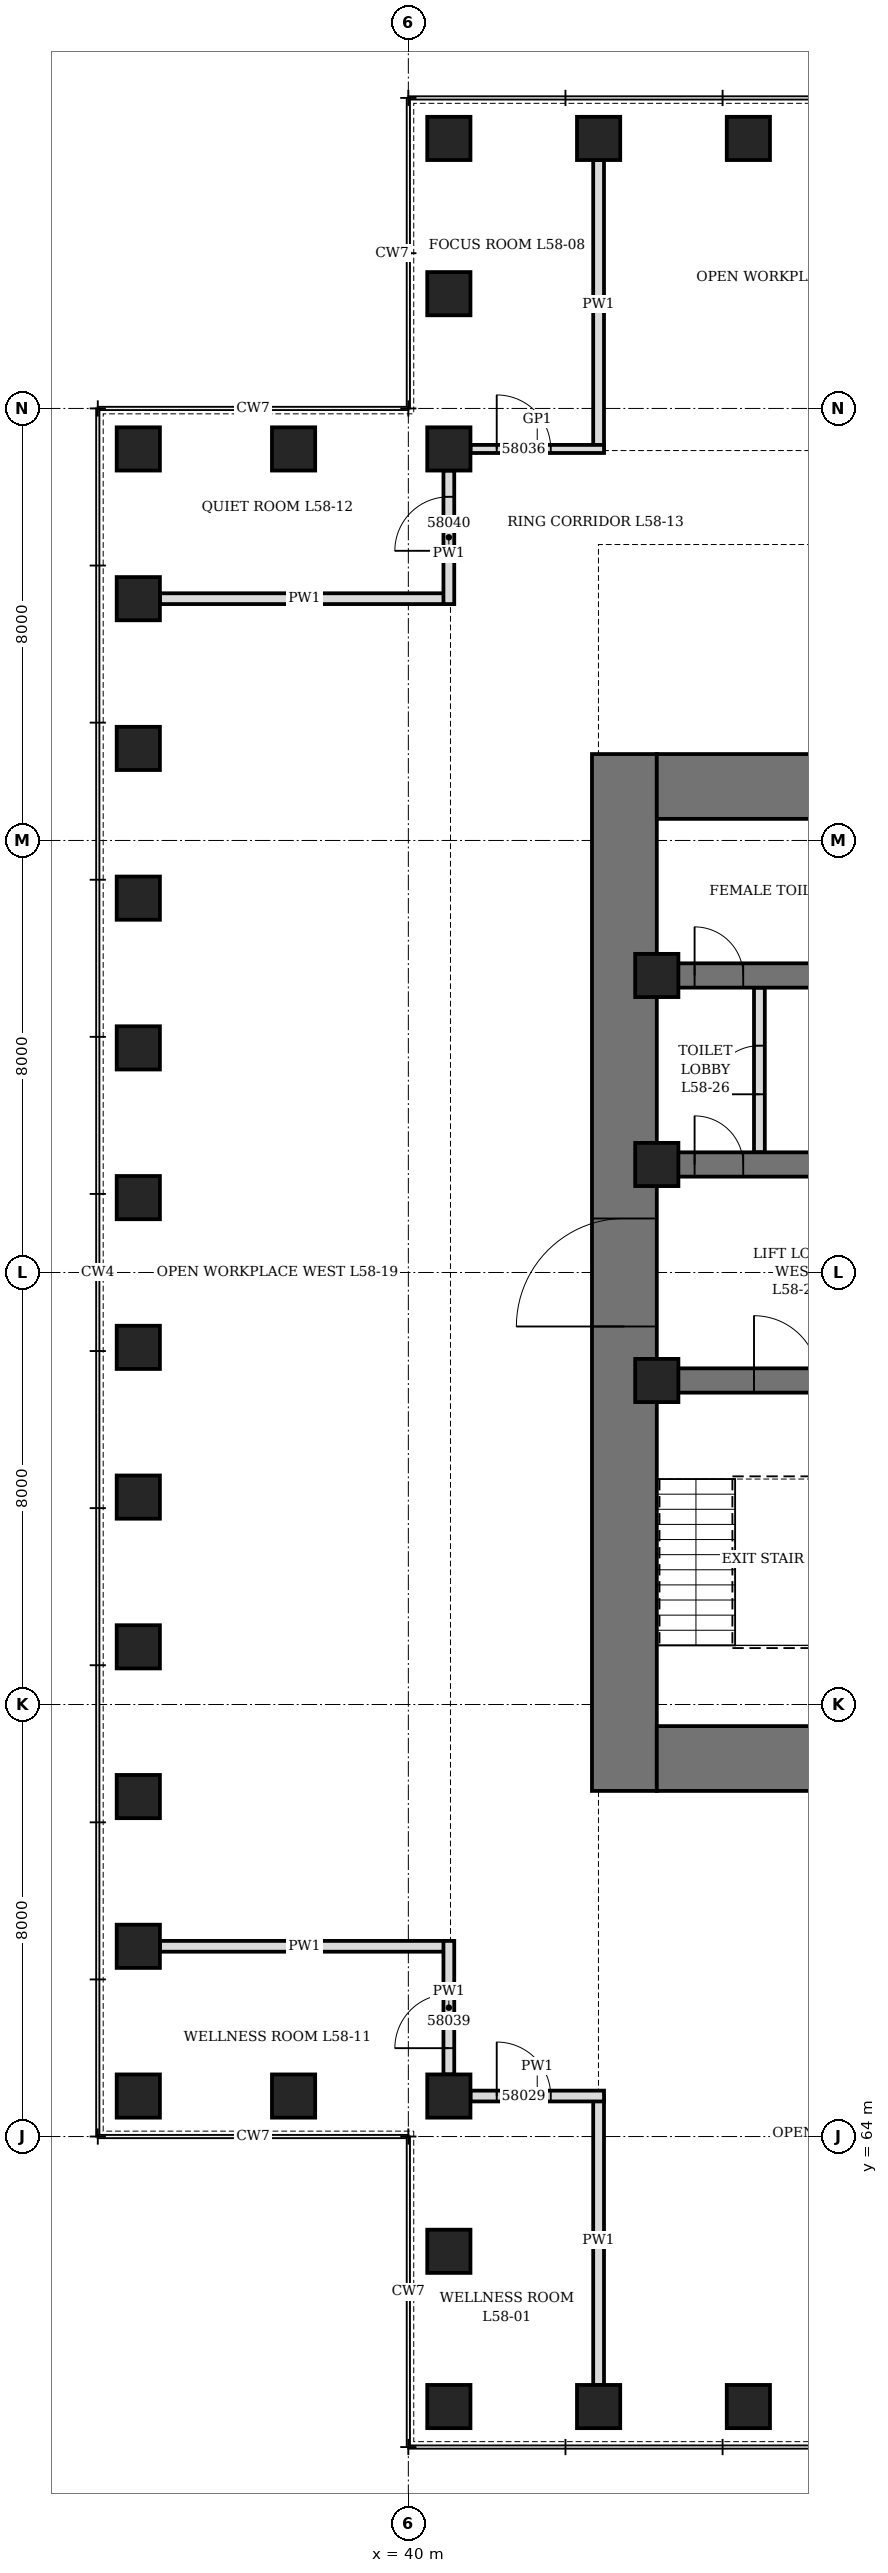
"""IFC4 building model, lengths in metres.
Left out: names, types, materials, properties, quantities, classifications, styles, units other than length and angle.
Written with IfcOpenShell. Run it as: python <this file> out.ifc"""

import sys

from ifc_helpers import new_model, si_unit, direction, frame, frame_2d, origin, origin_2d, place, context, subcontext, project, spatial, rectangle, hollow_rectangle, extrude, element, fill, save


model = new_model("IFC4")
c1 = context("Model", 3, precision=1e-05, world=origin(), true_north=direction((0.0, 1.0)))
c2 = subcontext(c1, "Body", "Model", "MODEL_VIEW")
j1 = project(units=[si_unit("LENGTHUNIT", "METRE"), si_unit("PLANEANGLEUNIT", "RADIAN")], contexts=[c1])
p1 = place(None, origin())
s1 = spatial("IfcSite", under=j1, at=p1, CompositionType="ELEMENT")
p2 = place(p1, origin())
s2 = spatial("IfcBuilding", under=s1, at=p2, CompositionType="ELEMENT")
p3 = place(p2, frame((0.0, 0.0, 258.7)))
s3 = spatial("IfcBuildingStorey", under=s2, at=p3, CompositionType="ELEMENT", Elevation=258.7)
for number, where, z_axis, x_axis in (
    (1, (40.75, 59.0, 0.0), (0.0, 0.0, 1.0), (1.0, 0.0, 0.0)),
    (2, (43.523, 59.0, 0.0), (0.0, 0.0, 1.0), (1.0, 0.0, 0.0)),
    (3, (46.295, 59.0, 0.0), (0.0, 0.0, 1.0), (1.0, 0.0, 0.0)),
    (4, (46.295, 101.0, 0.0), (0.0, 0.0, 1.0), (1.0, 0.0, 0.0)),
    (5, (43.523, 101.0, 0.0), (0.0, 0.0, 1.0), (1.0, 0.0, 0.0)),
    (6, (40.75, 101.0, 0.0), (0.0, 0.0, 1.0), (0.0, 1.0, 0.0)),
    (7, (40.75, 98.125, 0.0), (0.0, 0.0, 1.0), (0.0, 1.0, 0.0)),
    (8, (40.75, 95.25, 0.0), (0.0, 0.0, 1.0), (1.0, 0.0, 0.0)),
    (9, (37.875, 95.25, 0.0), (0.0, 0.0, 1.0), (1.0, 0.0, 0.0)),
    (10, (35.0, 95.25, 0.0), (0.0, 0.0, 1.0), (0.0, 1.0, 0.0)),
    (11, (35.0, 92.477, 0.0), (0.0, 0.0, 1.0), (0.0, 1.0, 0.0)),
    (12, (35.0, 89.705, 0.0), (0.0, 0.0, 1.0), (0.0, 1.0, 0.0)),
    (13, (35.0, 86.932, 0.0), (0.0, 0.0, 1.0), (0.0, 1.0, 0.0)),
    (14, (35.0, 84.159, 0.0), (0.0, 0.0, 1.0), (0.0, 1.0, 0.0)),
    (15, (35.0, 81.386, 0.0), (0.0, 0.0, 1.0), (0.0, 1.0, 0.0)),
    (16, (35.0, 78.614, 0.0), (0.0, 0.0, 1.0), (0.0, 1.0, 0.0)),
    (17, (35.0, 75.841, 0.0), (0.0, 0.0, 1.0), (0.0, 1.0, 0.0)),
    (18, (35.0, 73.068, 0.0), (0.0, 0.0, 1.0), (0.0, 1.0, 0.0)),
    (19, (35.0, 70.295, 0.0), (0.0, 0.0, 1.0), (0.0, 1.0, 0.0)),
    (20, (35.0, 67.523, 0.0), (0.0, 0.0, 1.0), (0.0, 1.0, 0.0)),
    (21, (35.0, 64.75, 0.0), (0.0, 0.0, 1.0), (1.0, 0.0, 0.0)),
    (22, (37.875, 64.75, 0.0), (0.0, 0.0, 1.0), (1.0, 0.0, 0.0)),
    (23, (40.75, 64.75, 0.0), (0.0, 0.0, 1.0), (0.0, 1.0, 0.0)),
    (24, (40.75, 61.875, 0.0), (0.0, 0.0, 1.0), (0.0, 1.0, 0.0)),
):
    element("IfcColumn", number, at=place(p3, frame(where, z_axis=z_axis, x_axis=x_axis)), inside=s3, PredefinedType="COLUMN", context=c2, shape_type="SweptSolid", body=[
        extrude(hollow_rectangle(XDim=0.8, YDim=0.8, WallThickness=0.1, at=origin_2d()), origin(), (0.0, 0.0, 1.0), 4.2),
    ])
p4 = place(p3, frame((44.0, 70.4, 0.0), z_axis=(0.0, 0.0, 1.0), x_axis=(0.0, 1.0, 0.0)))
e25 = element("IfcWall", 25, at=p4, inside=s3, PredefinedType="SHEAR", context=c2, shape_type="SweptSolid", body=[
    extrude(rectangle(XDim=19.2, YDim=1.2, at=frame_2d((9.6, 0.0))), origin(), (0.0, 0.0, 1.0), 4.2),
])
p5 = place(p4, frame((8.6, 0.0, 0.0)))
e26 = element("IfcOpeningElement", 26, at=p5, cuts=e25, PredefinedType="OPENING", context=c2, shape_type="SweptSolid", body=[
    extrude(rectangle(XDim=2.0, YDim=2.4, at=frame_2d((1.0, 1.2))), frame((0.0, 0.61, 0.0), z_axis=(0.0, -1.0, 0.0), x_axis=(1.0, 0.0, 0.0)), (0.0, 0.0, 1.0), 1.22),
])
p6 = place(p3, frame((44.6, 71.0, 0.0), z_axis=(0.0, 0.0, 1.0), x_axis=(1.0, 0.0, 0.0)))
e27 = element("IfcWall", 27, at=p6, inside=s3, PredefinedType="SHEAR", context=c2, shape_type="SweptSolid", body=[
    extrude(rectangle(XDim=22.8, YDim=1.2, at=frame_2d((11.4, 0.0))), origin(), (0.0, 0.0, 1.0), 4.2),
])
p7 = place(p6, frame((6.35, 0.0, 0.0)))
e28 = element("IfcOpeningElement", 28, at=p7, cuts=e27, PredefinedType="OPENING", context=c2, shape_type="SweptSolid", body=[
    extrude(rectangle(XDim=1.1, YDim=2.2, at=frame_2d((0.55, 1.1))), frame((0.0, 0.61, 0.0), z_axis=(0.0, -1.0, 0.0), x_axis=(1.0, 0.0, 0.0)), (0.0, 0.0, 1.0), 1.22),
])
p8 = place(p6, frame((9.35, 0.0, 0.0)))
e29 = element("IfcOpeningElement", 29, at=p8, cuts=e27, PredefinedType="OPENING", context=c2, shape_type="SweptSolid", body=[
    extrude(rectangle(XDim=1.1, YDim=2.2, at=frame_2d((0.55, 1.1))), frame((0.0, 0.61, 0.0), z_axis=(0.0, -1.0, 0.0), x_axis=(1.0, 0.0, 0.0)), (0.0, 0.0, 1.0), 1.22),
])
p9 = place(p6, frame((12.35, 0.0, 0.0)))
e30 = element("IfcOpeningElement", 30, at=p9, cuts=e27, PredefinedType="OPENING", context=c2, shape_type="SweptSolid", body=[
    extrude(rectangle(XDim=1.1, YDim=2.2, at=frame_2d((0.55, 1.1))), frame((0.0, 0.61, 0.0), z_axis=(0.0, -1.0, 0.0), x_axis=(1.0, 0.0, 0.0)), (0.0, 0.0, 1.0), 1.22),
])
p10 = place(p6, frame((15.35, 0.0, 0.0)))
e31 = element("IfcOpeningElement", 31, at=p10, cuts=e27, PredefinedType="OPENING", context=c2, shape_type="SweptSolid", body=[
    extrude(rectangle(XDim=1.1, YDim=2.2, at=frame_2d((0.55, 1.1))), frame((0.0, 0.61, 0.0), z_axis=(0.0, -1.0, 0.0), x_axis=(1.0, 0.0, 0.0)), (0.0, 0.0, 1.0), 1.22),
])
p11 = place(p3, frame((44.6, 89.0, 0.0), z_axis=(0.0, 0.0, 1.0), x_axis=(1.0, 0.0, 0.0)))
e32 = element("IfcWall", 32, at=p11, inside=s3, PredefinedType="SHEAR", context=c2, shape_type="SweptSolid", body=[
    extrude(rectangle(XDim=22.8, YDim=1.2, at=frame_2d((11.4, 0.0))), origin(), (0.0, 0.0, 1.0), 4.2),
])
p12 = place(p11, frame((7.9, 0.0, 0.0)))
e33 = element("IfcOpeningElement", 33, at=p12, cuts=e32, PredefinedType="OPENING", context=c2, shape_type="SweptSolid", body=[
    extrude(rectangle(XDim=1.0, YDim=2.1, at=frame_2d((0.5, 1.05))), frame((0.0, 0.61, 0.0), z_axis=(0.0, -1.0, 0.0), x_axis=(1.0, 0.0, 0.0)), (0.0, 0.0, 1.0), 1.22),
])
p13 = place(p11, frame((12.025, 0.0, 0.0)))
e34 = element("IfcOpeningElement", 34, at=p13, cuts=e32, PredefinedType="OPENING", context=c2, shape_type="SweptSolid", body=[
    extrude(rectangle(XDim=0.9, YDim=2.1, at=frame_2d((0.45, 1.05))), frame((0.0, 0.61, 0.0), z_axis=(0.0, -1.0, 0.0), x_axis=(1.0, 0.0, 0.0)), (0.0, 0.0, 1.0), 1.22),
])
p14 = place(p11, frame((13.962, 0.0, 0.0)))
e35 = element("IfcOpeningElement", 35, at=p14, cuts=e32, PredefinedType="OPENING", context=c2, shape_type="SweptSolid", body=[
    extrude(rectangle(XDim=0.9, YDim=2.1, at=frame_2d((0.45, 1.05))), frame((0.0, 0.61, 0.0), z_axis=(0.0, -1.0, 0.0), x_axis=(1.0, 0.0, 0.0)), (0.0, 0.0, 1.0), 1.22),
])
p15 = place(p3, frame((44.6, 78.0, 0.0), z_axis=(0.0, 0.0, 1.0), x_axis=(1.0, 0.0, 0.0)))
e36 = element("IfcWall", 36, at=p15, inside=s3, PredefinedType="SHEAR", context=c2, shape_type="SweptSolid", body=[
    extrude(rectangle(XDim=5.175, YDim=0.45, at=frame_2d((2.587, 0.0))), origin(), (0.0, 0.0, 1.0), 4.2),
])
p16 = place(p15, frame((1.8, 0.0, 0.0)))
e37 = element("IfcOpeningElement", 37, at=p16, cuts=e36, PredefinedType="OPENING", context=c2, shape_type="SweptSolid", body=[
    extrude(rectangle(XDim=1.2, YDim=2.1, at=frame_2d((0.6, 1.05))), frame((0.0, 0.235, 0.0), z_axis=(0.0, -1.0, 0.0), x_axis=(1.0, 0.0, 0.0)), (0.0, 0.0, 1.0), 0.47),
])
p17 = place(p3, frame((44.6, 82.0, 0.0), z_axis=(0.0, 0.0, 1.0), x_axis=(1.0, 0.0, 0.0)))
e38 = element("IfcWall", 38, at=p17, inside=s3, PredefinedType="SHEAR", context=c2, shape_type="SweptSolid", body=[
    extrude(rectangle(XDim=5.175, YDim=0.45, at=frame_2d((2.587, 0.0))), origin(), (0.0, 0.0, 1.0), 4.2),
])
p18 = place(p17, frame((0.7, 0.0, 0.0)))
e39 = element("IfcOpeningElement", 39, at=p18, cuts=e38, PredefinedType="OPENING", context=c2, shape_type="SweptSolid", body=[
    extrude(rectangle(XDim=0.9, YDim=2.1, at=frame_2d((0.45, 1.05))), frame((0.0, 0.235, 0.0), z_axis=(0.0, -1.0, 0.0), x_axis=(1.0, 0.0, 0.0)), (0.0, 0.0, 1.0), 0.47),
])
p19 = place(p3, frame((44.6, 85.5, 0.0), z_axis=(0.0, 0.0, 1.0), x_axis=(1.0, 0.0, 0.0)))
e40 = element("IfcWall", 40, at=p19, inside=s3, PredefinedType="SHEAR", context=c2, shape_type="SweptSolid", body=[
    extrude(rectangle(XDim=5.175, YDim=0.45, at=frame_2d((2.587, 0.0))), origin(), (0.0, 0.0, 1.0), 4.2),
])
p20 = place(p19, frame((0.7, 0.0, 0.0)))
e41 = element("IfcOpeningElement", 41, at=p20, cuts=e40, PredefinedType="OPENING", context=c2, shape_type="SweptSolid", body=[
    extrude(rectangle(XDim=0.9, YDim=2.1, at=frame_2d((0.45, 1.05))), frame((0.0, 0.235, 0.0), z_axis=(0.0, -1.0, 0.0), x_axis=(1.0, 0.0, 0.0)), (0.0, 0.0, 1.0), 0.47),
])
for number, where, z_axis, x_axis in (
    (42, (44.6, 78.0, 0.0), (0.0, 0.0, 1.0), (1.0, 0.0, 0.0)),
    (43, (44.6, 82.0, 0.0), (0.0, 0.0, 1.0), (1.0, 0.0, 0.0)),
    (44, (44.6, 85.5, 0.0), (0.0, 0.0, 1.0), (1.0, 0.0, 0.0)),
):
    element("IfcColumn", number, at=place(p3, frame(where, z_axis=z_axis, x_axis=x_axis)), inside=s3, PredefinedType="COLUMN", context=c2, shape_type="SweptSolid", body=[
        extrude(hollow_rectangle(XDim=0.8, YDim=0.8, WallThickness=0.1, at=origin_2d()), origin(), (0.0, 0.0, 1.0), 4.2),
    ])
p21 = place(p3, frame((46.5, 82.225, 0.0), z_axis=(0.0, 0.0, 1.0), x_axis=(0.0, 1.0, 0.0)))
e45 = element("IfcWall", 45, at=p21, inside=s3, PredefinedType="PARTITIONING", context=c2, shape_type="SweptSolid", body=[
    extrude(rectangle(XDim=3.05, YDim=0.2, at=frame_2d((1.525, 0.0))), origin(), (0.0, 0.0, 1.0), 4.04),
])
p22 = place(p21, frame((1.075, 0.0, 0.0)))
e46 = element("IfcOpeningElement", 46, at=p22, cuts=e45, PredefinedType="OPENING", context=c2, shape_type="SweptSolid", body=[
    extrude(rectangle(XDim=0.9, YDim=2.1, at=frame_2d((0.45, 1.05))), frame((0.0, 0.11, 0.0), z_axis=(0.0, -1.0, 0.0), x_axis=(1.0, 0.0, 0.0)), (0.0, 0.0, 1.0), 0.22),
])
for number, where, z_axis, x_axis in (
    (47, (43.523, 59.4, 0.0), (0.0, 0.0, 1.0), (0.0, 1.0, 0.0)),
    (48, (43.523, 95.25, 0.0), (0.0, 0.0, 1.0), (0.0, 1.0, 0.0)),
    (49, (35.4, 67.523, 0.0), (0.0, 0.0, 1.0), (1.0, 0.0, 0.0)),
    (50, (35.4, 92.477, 0.0), (0.0, 0.0, 1.0), (1.0, 0.0, 0.0)),
):
    element("IfcWall", number, at=place(p3, frame(where, z_axis=z_axis, x_axis=x_axis)), inside=s3, PredefinedType="PARTITIONING", context=c2, shape_type="SweptSolid", body=[
        extrude(rectangle(XDim=5.35, YDim=0.2, at=frame_2d((2.675, 0.0))), origin(), (0.0, 0.0, 1.0), 3.428),
    ])
p23 = place(p3, frame((41.15, 64.75, 0.0), z_axis=(0.0, 0.0, 1.0), x_axis=(1.0, 0.0, 0.0)))
e51 = element("IfcWall", 51, at=p23, inside=s3, PredefinedType="PARTITIONING", context=c2, shape_type="SweptSolid", body=[
    extrude(rectangle(XDim=2.473, YDim=0.2, at=frame_2d((1.236, 0.0))), origin(), (0.0, 0.0, 1.0), 4.04),
])
p24 = place(p23, frame((0.486, 0.0, 0.0)))
e52 = element("IfcOpeningElement", 52, at=p24, cuts=e51, PredefinedType="OPENING", context=c2, shape_type="SweptSolid", body=[
    extrude(rectangle(XDim=1.0, YDim=2.1, at=frame_2d((0.5, 1.05))), frame((0.0, 0.11, 0.0), z_axis=(0.0, -1.0, 0.0), x_axis=(1.0, 0.0, 0.0)), (0.0, 0.0, 1.0), 0.22),
])
p25 = place(p3, frame((41.15, 95.25, 0.0), z_axis=(0.0, 0.0, 1.0), x_axis=(1.0, 0.0, 0.0)))
e53 = element("IfcWall", 53, at=p25, inside=s3, PredefinedType="PARTITIONING", context=c2, shape_type="SweptSolid", body=[
    extrude(rectangle(XDim=2.473, YDim=0.15, at=frame_2d((1.236, 0.0))), origin(), (0.0, 0.0, 1.0), 4.04),
])
p26 = place(p25, frame((0.486, 0.0, 0.0)))
e54 = element("IfcOpeningElement", 54, at=p26, cuts=e53, PredefinedType="OPENING", context=c2, shape_type="SweptSolid", body=[
    extrude(rectangle(XDim=1.0, YDim=2.4, at=frame_2d((0.5, 1.2))), frame((0.0, 0.085, 0.0), z_axis=(0.0, -1.0, 0.0), x_axis=(1.0, 0.0, 0.0)), (0.0, 0.0, 1.0), 0.17),
])
p27 = place(p3, frame((40.75, 65.15, 0.0), z_axis=(0.0, 0.0, 1.0), x_axis=(0.0, 1.0, 0.0)))
e55 = element("IfcWall", 55, at=p27, inside=s3, PredefinedType="PARTITIONING", context=c2, shape_type="SweptSolid", body=[
    extrude(rectangle(XDim=2.473, YDim=0.2, at=frame_2d((1.236, 0.0))), origin(), (0.0, 0.0, 1.0), 4.04),
])
p28 = place(p27, frame((0.486, 0.0, 0.0)))
e56 = element("IfcOpeningElement", 56, at=p28, cuts=e55, PredefinedType="OPENING", context=c2, shape_type="SweptSolid", body=[
    extrude(rectangle(XDim=1.0, YDim=2.1, at=frame_2d((0.5, 1.05))), frame((0.0, 0.11, 0.0), z_axis=(0.0, -1.0, 0.0), x_axis=(1.0, 0.0, 0.0)), (0.0, 0.0, 1.0), 0.22),
])
p29 = place(p3, frame((40.75, 92.377, 0.0), z_axis=(0.0, 0.0, 1.0), x_axis=(0.0, 1.0, 0.0)))
e57 = element("IfcWall", 57, at=p29, inside=s3, PredefinedType="PARTITIONING", context=c2, shape_type="SweptSolid", body=[
    extrude(rectangle(XDim=2.473, YDim=0.2, at=frame_2d((1.236, 0.0))), origin(), (0.0, 0.0, 1.0), 4.04),
])
p30 = place(p29, frame((0.986, 0.0, 0.0)))
e58 = element("IfcOpeningElement", 58, at=p30, cuts=e57, PredefinedType="OPENING", context=c2, shape_type="SweptSolid", body=[
    extrude(rectangle(XDim=1.0, YDim=2.1, at=frame_2d((0.5, 1.05))), frame((0.0, 0.11, 0.0), z_axis=(0.0, -1.0, 0.0), x_axis=(1.0, 0.0, 0.0)), (0.0, 0.0, 1.0), 0.22),
])
p31 = place(p18, origin())
e59 = element("IfcDoor", 59, at=p31, inside=s3, OperationType="SINGLE_SWING_LEFT", PredefinedType="DOOR", context=c2, shape_type="SweptSolid", body=[
    extrude(rectangle(XDim=0.9, YDim=2.1, at=frame_2d((0.45, 1.05))), frame((0.0, 0.225, 0.0), z_axis=(0.0, -1.0, 0.0), x_axis=(1.0, 0.0, 0.0)), (0.0, 0.0, 1.0), 0.449),
])
fill(e39, e59)
p32 = place(p22, origin())
e60 = element("IfcDoor", 60, at=p32, inside=s3, OperationType="SINGLE_SWING_RIGHT", PredefinedType="DOOR", context=c2, shape_type="SweptSolid", body=[
    extrude(rectangle(XDim=0.9, YDim=2.1, at=frame_2d((0.45, 1.05))), frame((0.0, 0.1, 0.0), z_axis=(0.0, -1.0, 0.0), x_axis=(1.0, 0.0, 0.0)), (0.0, 0.0, 1.0), 0.199),
])
fill(e46, e60)
p33 = place(p20, origin())
e61 = element("IfcDoor", 61, at=p33, inside=s3, OperationType="SINGLE_SWING_RIGHT", PredefinedType="DOOR", context=c2, shape_type="SweptSolid", body=[
    extrude(rectangle(XDim=0.9, YDim=2.1, at=frame_2d((0.45, 1.05))), frame((0.0, 0.225, 0.0), z_axis=(0.0, -1.0, 0.0), x_axis=(1.0, 0.0, 0.0)), (0.0, 0.0, 1.0), 0.449),
])
fill(e41, e61)
p34 = place(p16, origin())
e62 = element("IfcDoor", 62, at=p34, inside=s3, OperationType="SINGLE_SWING_LEFT", PredefinedType="DOOR", context=c2, shape_type="SweptSolid", body=[
    extrude(rectangle(XDim=1.2, YDim=2.1, at=frame_2d((0.6, 1.05))), frame((0.0, 0.225, 0.0), z_axis=(0.0, -1.0, 0.0), x_axis=(1.0, 0.0, 0.0)), (0.0, 0.0, 1.0), 0.449),
])
fill(e37, e62)
p35 = place(p5, origin())
e63 = element("IfcDoor", 63, at=p35, inside=s3, OperationType="DOUBLE_DOOR_SINGLE_SWING", PredefinedType="DOOR", context=c2, shape_type="SweptSolid", body=[
    extrude(rectangle(XDim=2.0, YDim=2.4, at=frame_2d((1.0, 1.2))), frame((0.0, 0.35, 0.0), z_axis=(0.0, -1.0, 0.0), x_axis=(1.0, 0.0, 0.0)), (0.0, 0.0, 1.0), 0.7),
])
fill(e26, e63)
p36 = place(p24, origin())
e64 = element("IfcDoor", 64, at=p36, inside=s3, OperationType="SINGLE_SWING_LEFT", PredefinedType="DOOR", context=c2, shape_type="SweptSolid", body=[
    extrude(rectangle(XDim=1.0, YDim=2.1, at=frame_2d((0.5, 1.05))), frame((0.0, 0.1, 0.0), z_axis=(0.0, -1.0, 0.0), x_axis=(1.0, 0.0, 0.0)), (0.0, 0.0, 1.0), 0.199),
])
fill(e52, e64)
p37 = place(p26, origin())
e65 = element("IfcDoor", 65, at=p37, inside=s3, OperationType="SINGLE_SWING_RIGHT", PredefinedType="DOOR", context=c2, shape_type="SweptSolid", body=[
    extrude(rectangle(XDim=1.0, YDim=2.4, at=frame_2d((0.5, 1.2))), frame((0.0, 0.075, 0.0), z_axis=(0.0, -1.0, 0.0), x_axis=(1.0, 0.0, 0.0)), (0.0, 0.0, 1.0), 0.149),
])
fill(e54, e65)
p38 = place(p28, origin())
e66 = element("IfcDoor", 66, at=p38, inside=s3, OperationType="SINGLE_SWING_LEFT", PredefinedType="DOOR", context=c2, shape_type="SweptSolid", body=[
    extrude(rectangle(XDim=1.0, YDim=2.1, at=frame_2d((0.5, 1.05))), frame((0.0, 0.1, 0.0), z_axis=(0.0, -1.0, 0.0), x_axis=(1.0, 0.0, 0.0)), (0.0, 0.0, 1.0), 0.199),
])
fill(e56, e66)
p39 = place(p30, origin())
e67 = element("IfcDoor", 67, at=p39, inside=s3, OperationType="SINGLE_SWING_LEFT", PredefinedType="DOOR", context=c2, shape_type="SweptSolid", body=[
    extrude(rectangle(XDim=1.0, YDim=2.1, at=frame_2d((0.5, 1.05))), frame((0.0, 0.1, 0.0), z_axis=(0.0, -1.0, 0.0), x_axis=(1.0, 0.0, 0.0)), (0.0, 0.0, 1.0), 0.199),
])
fill(e58, e67)
save(model, sys.argv[1])
